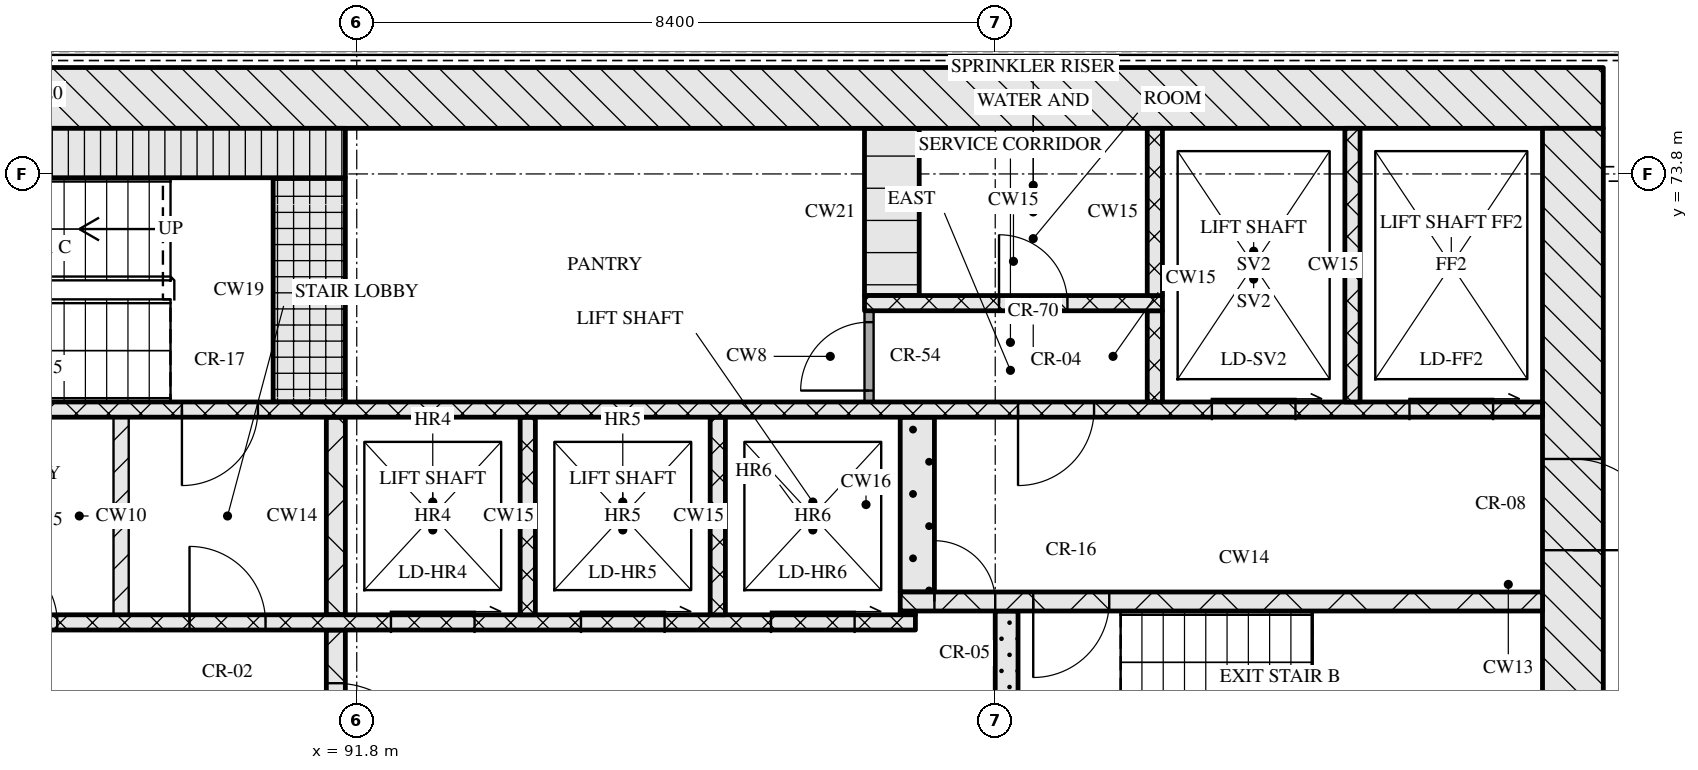
"""IFC4 building model, lengths in metres.
Left out: names, types, materials, properties, quantities, classifications, styles, units other than length and angle.
Written with IfcOpenShell. Run it as: python <this file> out.ifc"""

import sys

from ifc_helpers import new_model, si_unit, direction, frame, frame_2d, origin, place, context, subcontext, project, spatial, rectangle, extrude, element, fill, save


model = new_model("IFC4")
c1 = context("Model", 3, precision=1e-05, world=origin(), true_north=direction((0.0, 1.0)))
c2 = subcontext(c1, "Body", "Model", "MODEL_VIEW")
j1 = project(units=[si_unit("LENGTHUNIT", "METRE"), si_unit("PLANEANGLEUNIT", "RADIAN")], contexts=[c1])
p1 = place(None, origin())
s1 = spatial("IfcSite", under=j1, at=p1, CompositionType="ELEMENT")
p2 = place(p1, origin())
s2 = spatial("IfcBuilding", under=s1, at=p2, CompositionType="ELEMENT")
p3 = place(p2, frame((0.0, 0.0, 187.05)))
s3 = spatial("IfcBuildingStorey", under=s2, at=p3, CompositionType="ELEMENT", Elevation=187.05)
p4 = place(p3, frame((67.0, 74.8, 0.0), z_axis=(0.0, 0.0, 1.0), x_axis=(1.0, 0.0, 0.0)))
e1 = element("IfcWall", 1, at=p4, inside=s3, PredefinedType="SOLIDWALL", context=c2, shape_type="SweptSolid", body=[
    extrude(rectangle(XDim=41.2, YDim=0.8, at=frame_2d((20.6, 0.0))), origin(), (0.0, 0.0, 1.0), 3.32),
])
p5 = place(p3, frame((107.8, 62.4, 0.0), z_axis=(0.0, 0.0, 1.0), x_axis=(0.0, 1.0, 0.0)))
e2 = element("IfcWall", 2, at=p5, inside=s3, PredefinedType="SOLIDWALL", context=c2, shape_type="SweptSolid", body=[
    extrude(rectangle(XDim=12.0, YDim=0.8, at=frame_2d((6.0, 0.0))), origin(), (0.0, 0.0, 1.0), 3.32),
])
p6 = place(p5, frame((6.45, 0.0, 0.0)))
e3 = element("IfcOpeningElement", 3, at=p6, cuts=e2, PredefinedType="OPENING", context=c2, shape_type="SweptSolid", body=[
    extrude(rectangle(XDim=1.2, YDim=2.1, at=frame_2d((0.6, 1.05))), frame((0.0, 0.41, 0.0), z_axis=(0.0, -1.0, 0.0), x_axis=(1.0, 0.0, 0.0)), (0.0, 0.0, 1.0), 0.82),
])
p7 = place(p3, frame((91.525, 65.2, 0.0), z_axis=(0.0, 0.0, 1.0), x_axis=(0.0, 1.0, 0.0)))
e4 = element("IfcWall", 4, at=p7, inside=s3, PredefinedType="SOLIDWALL", context=c2, shape_type="SweptSolid", body=[
    extrude(rectangle(XDim=2.6, YDim=0.25, at=frame_2d((1.3, 0.0))), origin(), (0.0, 0.0, 1.0), 3.32),
])
p8 = place(p7, frame((0.7, 0.0, 0.0)))
e5 = element("IfcOpeningElement", 5, at=p8, cuts=e4, PredefinedType="OPENING", context=c2, shape_type="SweptSolid", body=[
    extrude(rectangle(XDim=1.2, YDim=2.1, at=frame_2d((0.6, 1.05))), frame((0.0, 0.135, 0.0), z_axis=(0.0, -1.0, 0.0), x_axis=(1.0, 0.0, 0.0)), (0.0, 0.0, 1.0), 0.27),
])
p9 = place(p3, frame((100.35, 65.2, 0.0), z_axis=(0.0, 0.0, 1.0), x_axis=(0.0, 1.0, 0.0)))
e6 = element("IfcWall", 6, at=p9, inside=s3, PredefinedType="SOLIDWALL", context=c2, shape_type="SweptSolid", body=[
    extrude(rectangle(XDim=2.85, YDim=0.3, at=frame_2d((1.425, 0.0))), origin(), (0.0, 0.0, 1.0), 3.32),
])
p10 = place(p3, frame((76.05, 67.9, 0.0), z_axis=(0.0, 0.0, 1.0), x_axis=(1.0, 0.0, 0.0)))
e7 = element("IfcWall", 7, at=p10, inside=s3, PredefinedType="SOLIDWALL", context=c2, shape_type="SweptSolid", body=[
    extrude(rectangle(XDim=23.1, YDim=0.2, at=frame_2d((11.55, 0.0))), origin(), (0.0, 0.0, 1.0), 3.32),
])
p11 = place(p10, frame((0.75, 0.0, 0.0)))
e8 = element("IfcOpeningElement", 8, at=p11, cuts=e7, PredefinedType="OPENING", context=c2, shape_type="SweptSolid", body=[
    extrude(rectangle(XDim=0.9, YDim=2.1, at=frame_2d((0.45, 1.05))), frame((0.0, 0.11, 0.0), z_axis=(0.0, -1.0, 0.0), x_axis=(1.0, 0.0, 0.0)), (0.0, 0.0, 1.0), 0.22),
])
p12 = place(p10, frame((3.32, 0.0, 0.0)))
e9 = element("IfcOpeningElement", 9, at=p12, cuts=e7, PredefinedType="OPENING", context=c2, shape_type="SweptSolid", body=[
    extrude(rectangle(XDim=0.9, YDim=2.1, at=frame_2d((0.45, 1.05))), frame((0.0, 0.11, 0.0), z_axis=(0.0, -1.0, 0.0), x_axis=(1.0, 0.0, 0.0)), (0.0, 0.0, 1.0), 0.22),
])
p13 = place(p10, frame((5.77, 0.0, 0.0)))
e10 = element("IfcOpeningElement", 10, at=p13, cuts=e7, PredefinedType="OPENING", context=c2, shape_type="SweptSolid", body=[
    extrude(rectangle(XDim=0.9, YDim=2.1, at=frame_2d((0.45, 1.05))), frame((0.0, 0.11, 0.0), z_axis=(0.0, -1.0, 0.0), x_axis=(1.0, 0.0, 0.0)), (0.0, 0.0, 1.0), 0.22),
])
p14 = place(p10, frame((8.45, 0.0, 0.0)))
e11 = element("IfcOpeningElement", 11, at=p14, cuts=e7, PredefinedType="OPENING", context=c2, shape_type="SweptSolid", body=[
    extrude(rectangle(XDim=0.9, YDim=2.1, at=frame_2d((0.45, 1.05))), frame((0.0, 0.11, 0.0), z_axis=(0.0, -1.0, 0.0), x_axis=(1.0, 0.0, 0.0)), (0.0, 0.0, 1.0), 0.22),
])
p15 = place(p10, frame((10.91, 0.0, 0.0)))
e12 = element("IfcOpeningElement", 12, at=p15, cuts=e7, PredefinedType="OPENING", context=c2, shape_type="SweptSolid", body=[
    extrude(rectangle(XDim=0.9, YDim=2.1, at=frame_2d((0.45, 1.05))), frame((0.0, 0.11, 0.0), z_axis=(0.0, -1.0, 0.0), x_axis=(1.0, 0.0, 0.0)), (0.0, 0.0, 1.0), 0.22),
])
p16 = place(p10, frame((13.55, 0.0, 0.0)))
e13 = element("IfcOpeningElement", 13, at=p16, cuts=e7, PredefinedType="OPENING", context=c2, shape_type="SweptSolid", body=[
    extrude(rectangle(XDim=1.0, YDim=2.1, at=frame_2d((0.5, 1.05))), frame((0.0, 0.11, 0.0), z_axis=(0.0, -1.0, 0.0), x_axis=(1.0, 0.0, 0.0)), (0.0, 0.0, 1.0), 0.22),
])
p17 = place(p10, frame((16.2, 0.0, 0.0)))
e14 = element("IfcOpeningElement", 14, at=p17, cuts=e7, PredefinedType="OPENING", context=c2, shape_type="SweptSolid", body=[
    extrude(rectangle(XDim=1.1, YDim=2.1, at=frame_2d((0.55, 1.05))), frame((0.0, 0.11, 0.0), z_axis=(0.0, -1.0, 0.0), x_axis=(1.0, 0.0, 0.0)), (0.0, 0.0, 1.0), 0.22),
])
p18 = place(p10, frame((18.7, 0.0, 0.0)))
e15 = element("IfcOpeningElement", 15, at=p18, cuts=e7, PredefinedType="OPENING", context=c2, shape_type="SweptSolid", body=[
    extrude(rectangle(XDim=1.1, YDim=2.1, at=frame_2d((0.55, 1.05))), frame((0.0, 0.11, 0.0), z_axis=(0.0, -1.0, 0.0), x_axis=(1.0, 0.0, 0.0)), (0.0, 0.0, 1.0), 0.22),
])
p19 = place(p10, frame((21.2, 0.0, 0.0)))
e16 = element("IfcOpeningElement", 16, at=p19, cuts=e7, PredefinedType="OPENING", context=c2, shape_type="SweptSolid", body=[
    extrude(rectangle(XDim=1.1, YDim=2.1, at=frame_2d((0.55, 1.05))), frame((0.0, 0.11, 0.0), z_axis=(0.0, -1.0, 0.0), x_axis=(1.0, 0.0, 0.0)), (0.0, 0.0, 1.0), 0.22),
])
p20 = place(p3, frame((88.7, 68.0, 0.0), z_axis=(0.0, 0.0, 1.0), x_axis=(0.0, 1.0, 0.0)))
e17 = element("IfcWall", 17, at=p20, inside=s3, PredefinedType="PARTITIONING", context=c2, shape_type="SweptSolid", body=[
    extrude(rectangle(XDim=2.6, YDim=0.2, at=frame_2d((1.3, 0.0))), origin(), (0.0, 0.0, 1.0), 3.32),
])
p21 = place(p3, frame((91.525, 68.0, 0.0), z_axis=(0.0, 0.0, 1.0), x_axis=(0.0, 1.0, 0.0)))
e18 = element("IfcWall", 18, at=p21, inside=s3, PredefinedType="SOLIDWALL", context=c2, shape_type="SweptSolid", body=[
    extrude(rectangle(XDim=2.6, YDim=0.25, at=frame_2d((1.3, 0.0))), origin(), (0.0, 0.0, 1.0), 3.32),
])
for number, where, z_axis, x_axis in (
    (19, (94.05, 68.0, 0.0), (0.0, 0.0, 1.0), (0.0, 1.0, 0.0)),
    (20, (96.55, 68.0, 0.0), (0.0, 0.0, 1.0), (0.0, 1.0, 0.0)),
):
    element("IfcWall", number, at=place(p3, frame(where, z_axis=z_axis, x_axis=x_axis)), inside=s3, PredefinedType="SOLIDWALL", context=c2, shape_type="SweptSolid", body=[
        extrude(rectangle(XDim=2.6, YDim=0.2, at=frame_2d((1.3, 0.0))), origin(), (0.0, 0.0, 1.0), 3.32),
    ])
p22 = place(p3, frame((98.95, 68.025, 0.0), z_axis=(0.0, 0.0, 1.0), x_axis=(1.0, 0.0, 0.0)))
e21 = element("IfcWall", 21, at=p22, inside=s3, PredefinedType="SOLIDWALL", context=c2, shape_type="SweptSolid", body=[
    extrude(rectangle(XDim=0.2, YDim=0.05, at=frame_2d((0.1, 0.0))), origin(), (0.0, 0.0, 1.0), 3.32),
])
p23 = place(p3, frame((98.95, 68.175, 0.0), z_axis=(0.0, 0.0, 1.0), x_axis=(1.0, 0.0, 0.0)))
e22 = element("IfcWall", 22, at=p23, inside=s3, PredefinedType="SOLIDWALL", context=c2, shape_type="SweptSolid", body=[
    extrude(rectangle(XDim=8.45, YDim=0.25, at=frame_2d((4.225, 0.0))), origin(), (0.0, 0.0, 1.0), 3.32),
])
p24 = place(p23, frame((0.45, 0.0, 0.0)))
e23 = element("IfcOpeningElement", 23, at=p24, cuts=e22, PredefinedType="OPENING", context=c2, shape_type="SweptSolid", body=[
    extrude(rectangle(XDim=0.8, YDim=2.1, at=frame_2d((0.4, 1.05))), frame((0.0, 0.135, 0.0), z_axis=(0.0, -1.0, 0.0), x_axis=(1.0, 0.0, 0.0)), (0.0, 0.0, 1.0), 0.27),
])
p25 = place(p23, frame((1.75, 0.0, 0.0)))
e24 = element("IfcOpeningElement", 24, at=p25, cuts=e22, PredefinedType="OPENING", context=c2, shape_type="SweptSolid", body=[
    extrude(rectangle(XDim=1.0, YDim=2.1, at=frame_2d((0.5, 1.05))), frame((0.0, 0.135, 0.0), z_axis=(0.0, -1.0, 0.0), x_axis=(1.0, 0.0, 0.0)), (0.0, 0.0, 1.0), 0.27),
])
p26 = place(p3, frame((99.175, 68.3, 0.0), z_axis=(0.0, 0.0, 1.0), x_axis=(0.0, 1.0, 0.0)))
e25 = element("IfcWall", 25, at=p26, inside=s3, PredefinedType="SOLIDWALL", context=c2, shape_type="SweptSolid", body=[
    extrude(rectangle(XDim=2.3, YDim=0.45, at=frame_2d((1.15, 0.0))), origin(), (0.0, 0.0, 1.0), 3.32),
])
p27 = place(p3, frame((67.8, 70.7, 0.0), z_axis=(0.0, 0.0, 1.0), x_axis=(1.0, 0.0, 0.0)))
e26 = element("IfcWall", 26, at=p27, inside=s3, PredefinedType="SOLIDWALL", context=c2, shape_type="SweptSolid", body=[
    extrude(rectangle(XDim=39.6, YDim=0.2, at=frame_2d((19.8, 0.0))), origin(), (0.0, 0.0, 1.0), 3.32),
])
p28 = place(p27, frame((0.65, 0.0, 0.0)))
e27 = element("IfcOpeningElement", 27, at=p28, cuts=e26, PredefinedType="OPENING", context=c2, shape_type="SweptSolid", body=[
    extrude(rectangle(XDim=1.1, YDim=2.1, at=frame_2d((0.55, 1.05))), frame((0.0, 0.11, 0.0), z_axis=(0.0, -1.0, 0.0), x_axis=(1.0, 0.0, 0.0)), (0.0, 0.0, 1.0), 0.22),
])
p29 = place(p27, frame((3.25, 0.0, 0.0)))
e28 = element("IfcOpeningElement", 28, at=p29, cuts=e26, PredefinedType="OPENING", context=c2, shape_type="SweptSolid", body=[
    extrude(rectangle(XDim=1.1, YDim=2.1, at=frame_2d((0.55, 1.05))), frame((0.0, 0.11, 0.0), z_axis=(0.0, -1.0, 0.0), x_axis=(1.0, 0.0, 0.0)), (0.0, 0.0, 1.0), 0.22),
])
p30 = place(p27, frame((5.9, 0.0, 0.0)))
e29 = element("IfcOpeningElement", 29, at=p30, cuts=e26, PredefinedType="OPENING", context=c2, shape_type="SweptSolid", body=[
    extrude(rectangle(XDim=1.0, YDim=2.1, at=frame_2d((0.5, 1.05))), frame((0.0, 0.11, 0.0), z_axis=(0.0, -1.0, 0.0), x_axis=(1.0, 0.0, 0.0)), (0.0, 0.0, 1.0), 0.22),
])
p31 = place(p27, frame((21.7, 0.0, 0.0)))
e30 = element("IfcOpeningElement", 30, at=p31, cuts=e26, PredefinedType="OPENING", context=c2, shape_type="SweptSolid", body=[
    extrude(rectangle(XDim=1.0, YDim=2.1, at=frame_2d((0.5, 1.05))), frame((0.0, 0.11, 0.0), z_axis=(0.0, -1.0, 0.0), x_axis=(1.0, 0.0, 0.0)), (0.0, 0.0, 1.0), 0.22),
])
p32 = place(p27, frame((32.7, 0.0, 0.0)))
e31 = element("IfcOpeningElement", 31, at=p32, cuts=e26, PredefinedType="OPENING", context=c2, shape_type="SweptSolid", body=[
    extrude(rectangle(XDim=1.0, YDim=2.1, at=frame_2d((0.5, 1.05))), frame((0.0, 0.11, 0.0), z_axis=(0.0, -1.0, 0.0), x_axis=(1.0, 0.0, 0.0)), (0.0, 0.0, 1.0), 0.22),
])
p33 = place(p27, frame((35.25, 0.0, 0.0)))
e32 = element("IfcOpeningElement", 32, at=p33, cuts=e26, PredefinedType="OPENING", context=c2, shape_type="SweptSolid", body=[
    extrude(rectangle(XDim=1.1, YDim=2.1, at=frame_2d((0.55, 1.05))), frame((0.0, 0.11, 0.0), z_axis=(0.0, -1.0, 0.0), x_axis=(1.0, 0.0, 0.0)), (0.0, 0.0, 1.0), 0.22),
])
p34 = place(p27, frame((37.85, 0.0, 0.0)))
e33 = element("IfcOpeningElement", 33, at=p34, cuts=e26, PredefinedType="OPENING", context=c2, shape_type="SweptSolid", body=[
    extrude(rectangle(XDim=1.1, YDim=2.1, at=frame_2d((0.55, 1.05))), frame((0.0, 0.11, 0.0), z_axis=(0.0, -1.0, 0.0), x_axis=(1.0, 0.0, 0.0)), (0.0, 0.0, 1.0), 0.22),
])
p35 = place(p3, frame((91.175, 70.8, 0.0), z_axis=(0.0, 0.0, 1.0), x_axis=(0.0, 1.0, 0.0)))
e34 = element("IfcWall", 34, at=p35, inside=s3, PredefinedType="SOLIDWALL", context=c2, shape_type="SweptSolid", body=[
    extrude(rectangle(XDim=2.95, YDim=0.95, at=frame_2d((1.475, 0.0))), origin(), (0.0, 0.0, 1.0), 3.32),
])
p36 = place(p3, frame((98.54, 70.8, 0.0), z_axis=(0.0, 0.0, 1.0), x_axis=(0.0, 1.0, 0.0)))
e35 = element("IfcWall", 35, at=p36, inside=s3, PredefinedType="PARTITIONING", context=c2, shape_type="SweptSolid", body=[
    extrude(rectangle(XDim=1.2, YDim=0.12, at=frame_2d((0.6, 0.0))), origin(), (0.0, 0.0, 1.0), 3.32),
])
p37 = place(p36, frame((0.15, 0.0, 0.0)))
e36 = element("IfcOpeningElement", 36, at=p37, cuts=e35, PredefinedType="OPENING", context=c2, shape_type="SweptSolid", body=[
    extrude(rectangle(XDim=0.9, YDim=2.1, at=frame_2d((0.45, 1.05))), frame((0.0, 0.07, 0.0), z_axis=(0.0, -1.0, 0.0), x_axis=(1.0, 0.0, 0.0)), (0.0, 0.0, 1.0), 0.14),
])
p38 = place(p3, frame((102.3, 70.8, 0.0), z_axis=(0.0, 0.0, 1.0), x_axis=(0.0, 1.0, 0.0)))
e37 = element("IfcWall", 37, at=p38, inside=s3, PredefinedType="SOLIDWALL", context=c2, shape_type="SweptSolid", body=[
    extrude(rectangle(XDim=1.2, YDim=0.2, at=frame_2d((0.6, 0.0))), origin(), (0.0, 0.0, 1.0), 3.32),
])
p39 = place(p3, frame((104.9, 70.8, 0.0), z_axis=(0.0, 0.0, 1.0), x_axis=(0.0, 1.0, 0.0)))
e38 = element("IfcWall", 38, at=p39, inside=s3, PredefinedType="SOLIDWALL", context=c2, shape_type="SweptSolid", body=[
    extrude(rectangle(XDim=3.6, YDim=0.2, at=frame_2d((1.8, 0.0))), origin(), (0.0, 0.0, 1.0), 3.32),
])
p40 = place(p3, frame((98.48, 72.1, 0.0), z_axis=(0.0, 0.0, 1.0), x_axis=(1.0, 0.0, 0.0)))
e39 = element("IfcWall", 39, at=p40, inside=s3, PredefinedType="SOLIDWALL", context=c2, shape_type="SweptSolid", body=[
    extrude(rectangle(XDim=3.92, YDim=0.2, at=frame_2d((1.96, 0.0))), origin(), (0.0, 0.0, 1.0), 3.32),
])
p41 = place(p40, frame((1.77, 0.0, 0.0)))
e40 = element("IfcOpeningElement", 40, at=p41, cuts=e39, PredefinedType="OPENING", context=c2, shape_type="SweptSolid", body=[
    extrude(rectangle(XDim=0.9, YDim=2.1, at=frame_2d((0.45, 1.05))), frame((0.0, 0.11, 0.0), z_axis=(0.0, -1.0, 0.0), x_axis=(1.0, 0.0, 0.0)), (0.0, 0.0, 1.0), 0.22),
])
p42 = place(p3, frame((98.84, 72.2, 0.0), z_axis=(0.0, 0.0, 1.0), x_axis=(0.0, 1.0, 0.0)))
e41 = element("IfcWall", 41, at=p42, inside=s3, PredefinedType="SOLIDWALL", context=c2, shape_type="SweptSolid", body=[
    extrude(rectangle(XDim=2.2, YDim=0.72, at=frame_2d((1.1, 0.0))), origin(), (0.0, 0.0, 1.0), 3.32),
])
p43 = place(p3, frame((102.3, 72.2, 0.0), z_axis=(0.0, 0.0, 1.0), x_axis=(0.0, 1.0, 0.0)))
e42 = element("IfcWall", 42, at=p43, inside=s3, PredefinedType="SOLIDWALL", context=c2, shape_type="SweptSolid", body=[
    extrude(rectangle(XDim=2.2, YDim=0.2, at=frame_2d((1.1, 0.0))), origin(), (0.0, 0.0, 1.0), 3.32),
])
p44 = place(p3, frame((83.55, 74.075, 0.0), z_axis=(0.0, 0.0, 1.0), x_axis=(1.0, 0.0, 0.0)))
e43 = element("IfcWall", 43, at=p44, inside=s3, PredefinedType="SOLIDWALL", context=c2, shape_type="SweptSolid", body=[
    extrude(rectangle(XDim=8.1, YDim=0.65, at=frame_2d((4.05, 0.0))), origin(), (0.0, 0.0, 1.0), 3.32),
])
p45 = place(p8, origin())
e44 = element("IfcDoor", 44, at=p45, inside=s3, OperationType="SINGLE_SWING_RIGHT", PredefinedType="DOOR", context=c2, shape_type="SweptSolid", body=[
    extrude(rectangle(XDim=1.2, YDim=2.1, at=frame_2d((0.6, 1.05))), frame((0.0, 0.025, 0.0), z_axis=(0.0, -1.0, 0.0), x_axis=(1.0, 0.0, 0.0)), (0.0, 0.0, 1.0), 0.05),
])
fill(e5, e44)
p46 = place(p15, origin())
e45 = element("IfcDoor", 45, at=p46, inside=s3, OperationType="SINGLE_SWING_LEFT", PredefinedType="DOOR", context=c2, shape_type="SweptSolid", body=[
    extrude(rectangle(XDim=0.9, YDim=2.1, at=frame_2d((0.45, 1.05))), frame((0.0, 0.025, 0.0), z_axis=(0.0, -1.0, 0.0), x_axis=(1.0, 0.0, 0.0)), (0.0, 0.0, 1.0), 0.05),
])
fill(e12, e45)
p47 = place(p16, origin())
e46 = element("IfcDoor", 46, at=p47, inside=s3, OperationType="SINGLE_SWING_LEFT", PredefinedType="DOOR", context=c2, shape_type="SweptSolid", body=[
    extrude(rectangle(XDim=1.0, YDim=2.1, at=frame_2d((0.5, 1.05))), frame((0.0, 0.025, 0.0), z_axis=(0.0, -1.0, 0.0), x_axis=(1.0, 0.0, 0.0)), (0.0, 0.0, 1.0), 0.05),
])
fill(e13, e46)
p48 = place(p17, origin())
e47 = element("IfcDoor", 47, at=p48, inside=s3, OperationType="SLIDING_TO_RIGHT", PredefinedType="DOOR", context=c2, shape_type="SweptSolid", body=[
    extrude(rectangle(XDim=1.1, YDim=2.1, at=frame_2d((0.55, 1.05))), frame((0.0, 0.025, 0.0), z_axis=(0.0, -1.0, 0.0), x_axis=(1.0, 0.0, 0.0)), (0.0, 0.0, 1.0), 0.05),
])
fill(e14, e47)
p49 = place(p18, origin())
e48 = element("IfcDoor", 48, at=p49, inside=s3, OperationType="SLIDING_TO_RIGHT", PredefinedType="DOOR", context=c2, shape_type="SweptSolid", body=[
    extrude(rectangle(XDim=1.1, YDim=2.1, at=frame_2d((0.55, 1.05))), frame((0.0, 0.025, 0.0), z_axis=(0.0, -1.0, 0.0), x_axis=(1.0, 0.0, 0.0)), (0.0, 0.0, 1.0), 0.05),
])
fill(e15, e48)
p50 = place(p19, origin())
e49 = element("IfcDoor", 49, at=p50, inside=s3, OperationType="SLIDING_TO_RIGHT", PredefinedType="DOOR", context=c2, shape_type="SweptSolid", body=[
    extrude(rectangle(XDim=1.1, YDim=2.1, at=frame_2d((0.55, 1.05))), frame((0.0, 0.025, 0.0), z_axis=(0.0, -1.0, 0.0), x_axis=(1.0, 0.0, 0.0)), (0.0, 0.0, 1.0), 0.05),
])
fill(e16, e49)
p51 = place(p24, origin())
e50 = element("IfcDoor", 50, at=p51, inside=s3, OperationType="SINGLE_SWING_LEFT", PredefinedType="DOOR", context=c2, shape_type="SweptSolid", body=[
    extrude(rectangle(XDim=0.8, YDim=2.1, at=frame_2d((0.4, 1.05))), frame((0.0, 0.025, 0.0), z_axis=(0.0, -1.0, 0.0), x_axis=(1.0, 0.0, 0.0)), (0.0, 0.0, 1.0), 0.05),
])
fill(e23, e50)
p52 = place(p25, origin())
e51 = element("IfcDoor", 51, at=p52, inside=s3, OperationType="SINGLE_SWING_RIGHT", PredefinedType="DOOR", context=c2, shape_type="SweptSolid", body=[
    extrude(rectangle(XDim=1.0, YDim=2.1, at=frame_2d((0.5, 1.05))), frame((0.0, 0.025, 0.0), z_axis=(0.0, -1.0, 0.0), x_axis=(1.0, 0.0, 0.0)), (0.0, 0.0, 1.0), 0.05),
])
fill(e24, e51)
p53 = place(p6, origin())
e52 = element("IfcDoor", 52, at=p53, inside=s3, OperationType="SINGLE_SWING_RIGHT", PredefinedType="DOOR", context=c2, shape_type="SweptSolid", body=[
    extrude(rectangle(XDim=1.2, YDim=2.1, at=frame_2d((0.6, 1.05))), frame((0.0, 0.025, 0.0), z_axis=(0.0, -1.0, 0.0), x_axis=(1.0, 0.0, 0.0)), (0.0, 0.0, 1.0), 0.05),
])
fill(e3, e52)
p54 = place(p31, origin())
e53 = element("IfcDoor", 53, at=p54, inside=s3, OperationType="SINGLE_SWING_RIGHT", PredefinedType="DOOR", context=c2, shape_type="SweptSolid", body=[
    extrude(rectangle(XDim=1.0, YDim=2.1, at=frame_2d((0.5, 1.05))), frame((0.0, 0.025, 0.0), z_axis=(0.0, -1.0, 0.0), x_axis=(1.0, 0.0, 0.0)), (0.0, 0.0, 1.0), 0.05),
])
fill(e30, e53)
p55 = place(p32, origin())
e54 = element("IfcDoor", 54, at=p55, inside=s3, OperationType="SINGLE_SWING_RIGHT", PredefinedType="DOOR", context=c2, shape_type="SweptSolid", body=[
    extrude(rectangle(XDim=1.0, YDim=2.1, at=frame_2d((0.5, 1.05))), frame((0.0, 0.025, 0.0), z_axis=(0.0, -1.0, 0.0), x_axis=(1.0, 0.0, 0.0)), (0.0, 0.0, 1.0), 0.05),
])
fill(e31, e54)
p56 = place(p33, origin())
e55 = element("IfcDoor", 55, at=p56, inside=s3, OperationType="SLIDING_TO_RIGHT", PredefinedType="DOOR", context=c2, shape_type="SweptSolid", body=[
    extrude(rectangle(XDim=1.1, YDim=2.1, at=frame_2d((0.55, 1.05))), frame((0.0, 0.025, 0.0), z_axis=(0.0, -1.0, 0.0), x_axis=(1.0, 0.0, 0.0)), (0.0, 0.0, 1.0), 0.05),
])
fill(e32, e55)
p57 = place(p34, origin())
e56 = element("IfcDoor", 56, at=p57, inside=s3, OperationType="SLIDING_TO_RIGHT", PredefinedType="DOOR", context=c2, shape_type="SweptSolid", body=[
    extrude(rectangle(XDim=1.1, YDim=2.1, at=frame_2d((0.55, 1.05))), frame((0.0, 0.025, 0.0), z_axis=(0.0, -1.0, 0.0), x_axis=(1.0, 0.0, 0.0)), (0.0, 0.0, 1.0), 0.05),
])
fill(e33, e56)
p58 = place(p37, origin())
e57 = element("IfcDoor", 57, at=p58, inside=s3, OperationType="SINGLE_SWING_LEFT", PredefinedType="DOOR", context=c2, shape_type="SweptSolid", body=[
    extrude(rectangle(XDim=0.9, YDim=2.1, at=frame_2d((0.45, 1.05))), frame((0.0, 0.025, 0.0), z_axis=(0.0, -1.0, 0.0), x_axis=(1.0, 0.0, 0.0)), (0.0, 0.0, 1.0), 0.05),
])
fill(e36, e57)
p59 = place(p41, origin())
e58 = element("IfcDoor", 58, at=p59, inside=s3, OperationType="SINGLE_SWING_LEFT", PredefinedType="DOOR", context=c2, shape_type="SweptSolid", body=[
    extrude(rectangle(XDim=0.9, YDim=2.1, at=frame_2d((0.45, 1.05))), frame((0.0, 0.025, 0.0), z_axis=(0.0, -1.0, 0.0), x_axis=(1.0, 0.0, 0.0)), (0.0, 0.0, 1.0), 0.05),
])
fill(e40, e58)
save(model, sys.argv[1])
